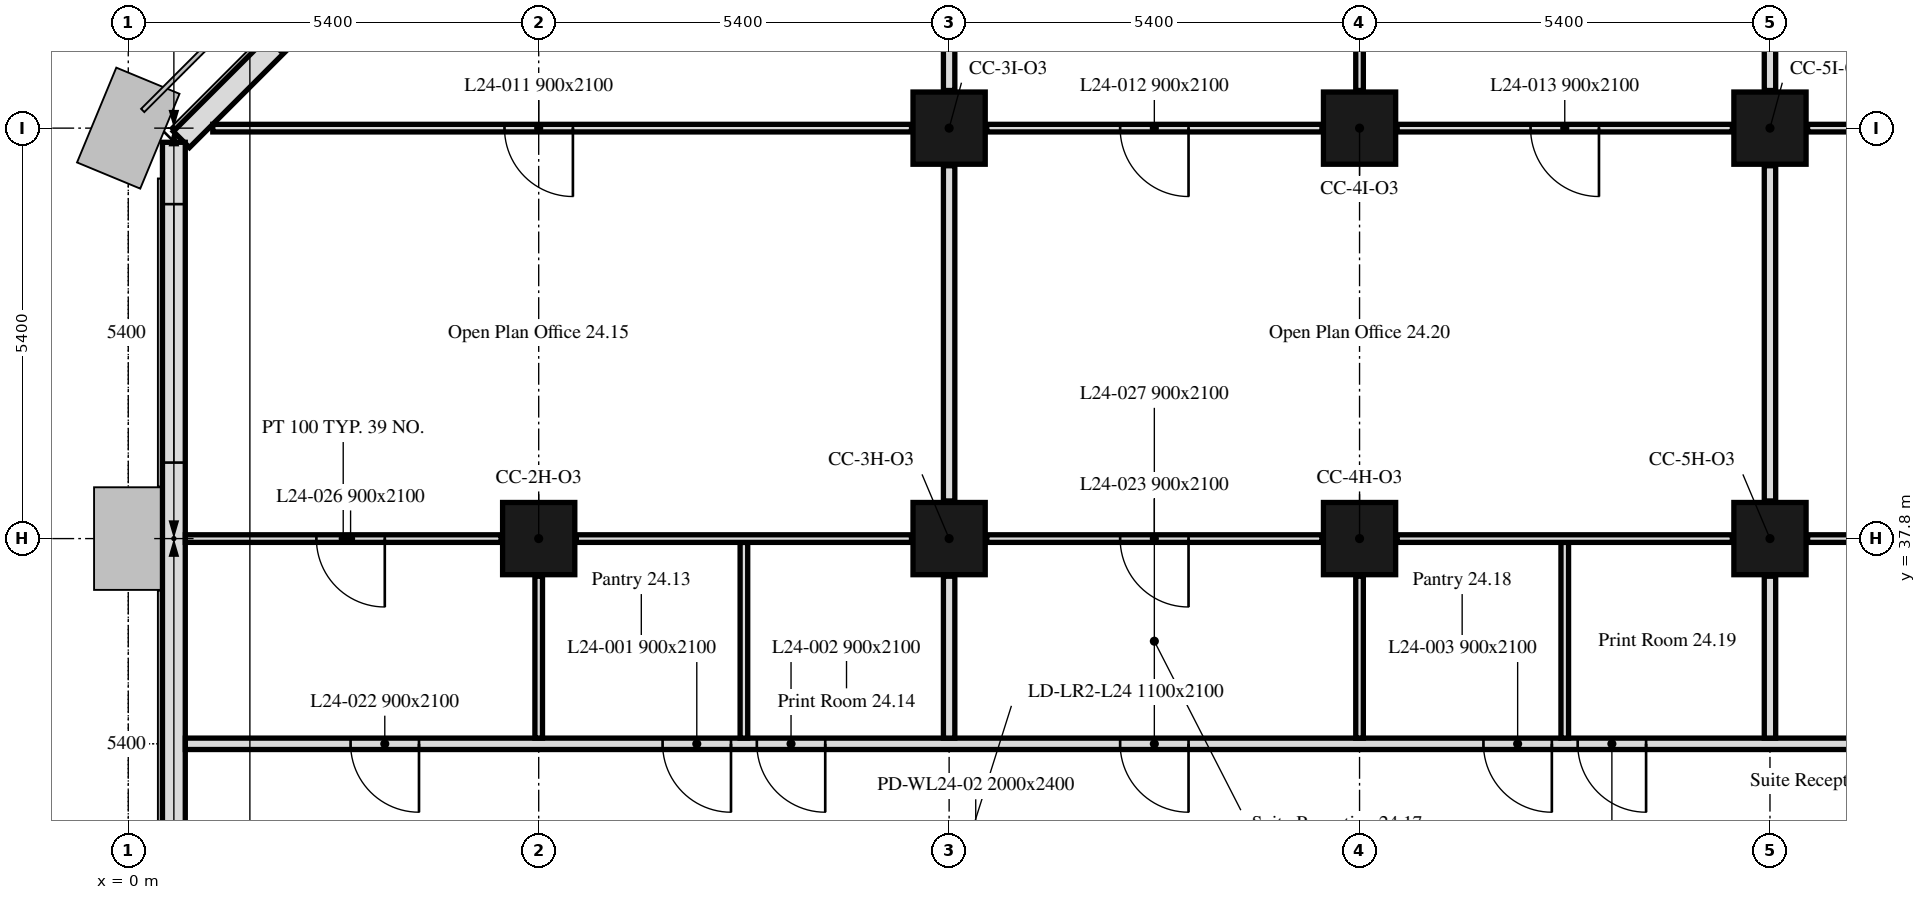
"""IFC4 building model, lengths in metres.
Left out: names, types, materials, properties, quantities, classifications, styles, units other than length and angle.
Written with IfcOpenShell. Run it as: python <this file> out.ifc"""

import sys

from ifc_helpers import new_model, si_unit, direction, frame, frame_2d, origin, origin_2d, place, context, subcontext, project, spatial, rectangle, extrude, element, fill, save


model = new_model("IFC4")
c1 = context("Model", 3, precision=1e-05, world=origin(), true_north=direction((0.0, 1.0)))
c2 = subcontext(c1, "Body", "Model", "MODEL_VIEW")
j1 = project(units=[si_unit("LENGTHUNIT", "METRE"), si_unit("PLANEANGLEUNIT", "RADIAN")], contexts=[c1])
p1 = place(None, origin())
s1 = spatial("IfcSite", under=j1, at=p1, CompositionType="ELEMENT")
p2 = place(p1, origin())
s2 = spatial("IfcBuilding", under=s1, at=p2, CompositionType="ELEMENT")
p3 = place(p2, frame((0.0, 0.0, 103.0)))
s3 = spatial("IfcBuildingStorey", under=s2, at=p3, CompositionType="ELEMENT", Elevation=103.0)
for number, where, z_axis, x_axis in (
    (1, (5.4, 37.8, 0.0), (0.0, 0.0, 1.0), (1.0, 0.0, 0.0)),
    (2, (10.8, 37.8, 0.0), (0.0, 0.0, 1.0), (1.0, 0.0, 0.0)),
    (3, (16.2, 37.8, 0.0), (0.0, 0.0, 1.0), (1.0, 0.0, 0.0)),
    (4, (21.6, 37.8, 0.0), (0.0, 0.0, 1.0), (1.0, 0.0, 0.0)),
    (5, (10.8, 43.2, 0.0), (0.0, 0.0, 1.0), (1.0, 0.0, 0.0)),
    (6, (16.2, 43.2, 0.0), (0.0, 0.0, 1.0), (1.0, 0.0, 0.0)),
    (7, (21.6, 43.2, 0.0), (0.0, 0.0, 1.0), (1.0, 0.0, 0.0)),
):
    element("IfcColumn", number, at=place(p3, frame(where, z_axis=z_axis, x_axis=x_axis)), inside=s3, PredefinedType="COLUMN", context=c2, shape_type="SweptSolid", body=[
        extrude(rectangle(XDim=0.95, YDim=0.95, at=origin_2d()), origin(), (0.0, 0.0, 1.0), 3.5),
    ])
p4 = place(p3, frame((5.55, 47.901, 0.0), z_axis=(0.0, 0.0, 1.0), x_axis=(-0.707106781187, -0.707106781187, 0.0)))
e8 = element("IfcWall", 8, at=p4, inside=s3, PredefinedType="SOLIDWALL", context=c2, shape_type="SweptSolid", body=[
    extrude(rectangle(XDim=6.86, YDim=0.3, at=frame_2d((3.43, 0.0))), origin(), (0.0, 0.0, 1.0), 3.5),
])
p5 = place(p4, frame((1.73, 0.0, 0.9)))
e9 = element("IfcOpeningElement", 9, at=p5, cuts=e8, PredefinedType="OPENING", context=c2, shape_type="SweptSolid", body=[
    extrude(rectangle(XDim=3.4, YDim=1.7, at=frame_2d((1.7, 0.85))), frame((0.0, 0.16, 0.0), z_axis=(0.0, -1.0, 0.0), x_axis=(1.0, 0.0, 0.0)), (0.0, 0.0, 1.0), 0.32),
])
p6 = place(p3, frame((0.6, 43.014, 0.0), z_axis=(0.0, 0.0, 1.0), x_axis=(0.0, -1.0, 0.0)))
e10 = element("IfcWall", 10, at=p6, inside=s3, PredefinedType="SOLIDWALL", context=c2, shape_type="SweptSolid", body=[
    extrude(rectangle(XDim=32.027, YDim=0.3, at=frame_2d((16.014, 0.0))), origin(), (0.0, 0.0, 1.0), 3.5),
])
p7 = place(p6, frame((0.814, 0.0, 0.9)))
e11 = element("IfcOpeningElement", 11, at=p7, cuts=e10, PredefinedType="OPENING", context=c2, shape_type="SweptSolid", body=[
    extrude(rectangle(XDim=3.4, YDim=1.7, at=frame_2d((1.7, 0.85))), frame((0.0, 0.16, 0.0), z_axis=(0.0, -1.0, 0.0), x_axis=(1.0, 0.0, 0.0)), (0.0, 0.0, 1.0), 0.32),
])
p8 = place(p6, frame((11.614, 0.0, 0.9)))
e12 = element("IfcOpeningElement", 12, at=p8, cuts=e10, PredefinedType="OPENING", context=c2, shape_type="SweptSolid", body=[
    extrude(rectangle(XDim=3.4, YDim=1.7, at=frame_2d((1.7, 0.85))), frame((0.0, 0.16, 0.0), z_axis=(0.0, -1.0, 0.0), x_axis=(1.0, 0.0, 0.0)), (0.0, 0.0, 1.0), 0.32),
])
p9 = place(p6, frame((22.414, 0.0, 0.9)))
e13 = element("IfcOpeningElement", 13, at=p9, cuts=e10, PredefinedType="OPENING", context=c2, shape_type="SweptSolid", body=[
    extrude(rectangle(XDim=3.4, YDim=1.7, at=frame_2d((1.7, 0.85))), frame((0.0, 0.16, 0.0), z_axis=(0.0, -1.0, 0.0), x_axis=(1.0, 0.0, 0.0)), (0.0, 0.0, 1.0), 0.32),
])
p10 = place(p3, frame((42.449, 35.1, 0.0), z_axis=(0.0, 0.0, 1.0), x_axis=(-1.0, 0.0, 0.0)))
e14 = element("IfcWall", 14, at=p10, inside=s3, PredefinedType="PARTITIONING", context=c2, shape_type="SweptSolid", body=[
    extrude(rectangle(XDim=41.698, YDim=0.15, at=frame_2d((20.849, 0.0))), origin(), (0.0, 0.0, 1.0), 2.75),
])
p11 = place(p10, frame((34.519, 0.0, 0.0)))
e15 = element("IfcOpeningElement", 15, at=p11, cuts=e14, PredefinedType="OPENING", context=c2, shape_type="SweptSolid", body=[
    extrude(rectangle(XDim=0.9, YDim=2.1, at=frame_2d((0.45, 1.05))), frame((0.0, 0.075, 0.0), z_axis=(0.0, -1.0, 0.0), x_axis=(1.0, 0.0, 0.0)), (0.0, 0.0, 1.0), 0.15),
])
p12 = place(p10, frame((33.279, 0.0, 0.0)))
e16 = element("IfcOpeningElement", 16, at=p12, cuts=e14, PredefinedType="OPENING", context=c2, shape_type="SweptSolid", body=[
    extrude(rectangle(XDim=0.9, YDim=2.1, at=frame_2d((0.45, 1.05))), frame((0.0, 0.075, 0.0), z_axis=(0.0, -1.0, 0.0), x_axis=(1.0, 0.0, 0.0)), (0.0, 0.0, 1.0), 0.15),
])
p13 = place(p10, frame((23.719, 0.0, 0.0)))
e17 = element("IfcOpeningElement", 17, at=p13, cuts=e14, PredefinedType="OPENING", context=c2, shape_type="SweptSolid", body=[
    extrude(rectangle(XDim=0.9, YDim=2.1, at=frame_2d((0.45, 1.05))), frame((0.0, 0.075, 0.0), z_axis=(0.0, -1.0, 0.0), x_axis=(1.0, 0.0, 0.0)), (0.0, 0.0, 1.0), 0.15),
])
p14 = place(p10, frame((22.479, 0.0, 0.0)))
e18 = element("IfcOpeningElement", 18, at=p14, cuts=e14, PredefinedType="OPENING", context=c2, shape_type="SweptSolid", body=[
    extrude(rectangle(XDim=0.9, YDim=2.1, at=frame_2d((0.45, 1.05))), frame((0.0, 0.075, 0.0), z_axis=(0.0, -1.0, 0.0), x_axis=(1.0, 0.0, 0.0)), (0.0, 0.0, 1.0), 0.15),
])
p15 = place(p10, frame((2.287, 0.0, 0.0)))
e19 = element("IfcOpeningElement", 19, at=p15, cuts=e14, PredefinedType="OPENING", context=c2, shape_type="SweptSolid", body=[
    extrude(rectangle(XDim=0.9, YDim=2.1, at=frame_2d((0.45, 1.05))), frame((0.0, 0.075, 0.0), z_axis=(0.0, -1.0, 0.0), x_axis=(1.0, 0.0, 0.0)), (0.0, 0.0, 1.0), 0.15),
])
p16 = place(p10, frame((0.879, 0.0, 0.0)))
e20 = element("IfcOpeningElement", 20, at=p16, cuts=e14, PredefinedType="OPENING", context=c2, shape_type="SweptSolid", body=[
    extrude(rectangle(XDim=0.9, YDim=2.1, at=frame_2d((0.45, 1.05))), frame((0.0, 0.075, 0.0), z_axis=(0.0, -1.0, 0.0), x_axis=(1.0, 0.0, 0.0)), (0.0, 0.0, 1.0), 0.15),
])
p17 = place(p10, frame((38.624, 0.0, 0.0)))
e21 = element("IfcOpeningElement", 21, at=p17, cuts=e14, PredefinedType="OPENING", context=c2, shape_type="SweptSolid", body=[
    extrude(rectangle(XDim=0.9, YDim=2.1, at=frame_2d((0.45, 1.05))), frame((0.0, 0.075, 0.0), z_axis=(0.0, -1.0, 0.0), x_axis=(1.0, 0.0, 0.0)), (0.0, 0.0, 1.0), 0.15),
])
p18 = place(p10, frame((28.499, 0.0, 0.0)))
e22 = element("IfcOpeningElement", 22, at=p18, cuts=e14, PredefinedType="OPENING", context=c2, shape_type="SweptSolid", body=[
    extrude(rectangle(XDim=0.9, YDim=2.1, at=frame_2d((0.45, 1.05))), frame((0.0, 0.075, 0.0), z_axis=(0.0, -1.0, 0.0), x_axis=(1.0, 0.0, 0.0)), (0.0, 0.0, 1.0), 0.15),
])
p19 = place(p10, frame((17.699, 0.0, 0.0)))
e23 = element("IfcOpeningElement", 23, at=p19, cuts=e14, PredefinedType="OPENING", context=c2, shape_type="SweptSolid", body=[
    extrude(rectangle(XDim=0.9, YDim=2.1, at=frame_2d((0.45, 1.05))), frame((0.0, 0.075, 0.0), z_axis=(0.0, -1.0, 0.0), x_axis=(1.0, 0.0, 0.0)), (0.0, 0.0, 1.0), 0.15),
])
p20 = place(p3, frame((4.905, 37.8, 0.0), z_axis=(0.0, 0.0, 1.0), x_axis=(-1.0, 0.0, 0.0)))
e24 = element("IfcWall", 24, at=p20, inside=s3, PredefinedType="PARTITIONING", context=c2, shape_type="SweptSolid", body=[
    extrude(rectangle(XDim=4.154, YDim=0.1, at=frame_2d((2.077, 0.0))), origin(), (0.0, 0.0, 1.0), 2.75),
])
p21 = place(p20, frame((1.53, 0.0, 0.0)))
e25 = element("IfcOpeningElement", 25, at=p21, cuts=e24, PredefinedType="OPENING", context=c2, shape_type="SweptSolid", body=[
    extrude(rectangle(XDim=0.9, YDim=2.1, at=frame_2d((0.45, 1.05))), frame((0.0, 0.05, 0.0), z_axis=(0.0, -1.0, 0.0), x_axis=(1.0, 0.0, 0.0)), (0.0, 0.0, 1.0), 0.1),
])
p22 = place(p3, frame((5.4, 35.175, 0.0), z_axis=(0.0, 0.0, 1.0), x_axis=(0.0, 1.0, 0.0)))
e26 = element("IfcWall", 26, at=p22, inside=s3, PredefinedType="PARTITIONING", context=c2, shape_type="SweptSolid", body=[
    extrude(rectangle(XDim=2.13, YDim=0.1, at=frame_2d((1.065, 0.0))), origin(), (0.0, 0.0, 1.0), 3.5),
])
p23 = place(p3, frame((8.1, 35.175, 0.0), z_axis=(0.0, 0.0, 1.0), x_axis=(0.0, 1.0, 0.0)))
e27 = element("IfcWall", 27, at=p23, inside=s3, PredefinedType="PARTITIONING", context=c2, shape_type="SweptSolid", body=[
    extrude(rectangle(XDim=2.575, YDim=0.1, at=frame_2d((1.288, 0.0))), origin(), (0.0, 0.0, 1.0), 3.5),
])
p24 = place(p3, frame((10.8, 35.175, 0.0), z_axis=(0.0, 0.0, 1.0), x_axis=(0.0, 1.0, 0.0)))
e28 = element("IfcWall", 28, at=p24, inside=s3, PredefinedType="PARTITIONING", context=c2, shape_type="SweptSolid", body=[
    extrude(rectangle(XDim=2.13, YDim=0.15, at=frame_2d((1.065, 0.0))), origin(), (0.0, 0.0, 1.0), 2.75),
])
p25 = place(p3, frame((10.305, 37.8, 0.0), z_axis=(0.0, 0.0, 1.0), x_axis=(-1.0, 0.0, 0.0)))
e29 = element("IfcWall", 29, at=p25, inside=s3, PredefinedType="PARTITIONING", context=c2, shape_type="SweptSolid", body=[
    extrude(rectangle(XDim=4.41, YDim=0.1, at=frame_2d((2.205, 0.0))), origin(), (0.0, 0.0, 1.0), 2.75),
])
p26 = place(p3, frame((10.305, 43.2, 0.0), z_axis=(0.0, 0.0, 1.0), x_axis=(-1.0, 0.0, 0.0)))
e30 = element("IfcWall", 30, at=p26, inside=s3, PredefinedType="PARTITIONING", context=c2, shape_type="SweptSolid", body=[
    extrude(rectangle(XDim=9.193, YDim=0.1, at=frame_2d((4.596, 0.0))), origin(), (0.0, 0.0, 1.0), 3.5),
])
p27 = place(p26, frame((4.455, 0.0, 0.0)))
e31 = element("IfcOpeningElement", 31, at=p27, cuts=e30, PredefinedType="OPENING", context=c2, shape_type="SweptSolid", body=[
    extrude(rectangle(XDim=0.9, YDim=2.1, at=frame_2d((0.45, 1.05))), frame((0.0, 0.05, 0.0), z_axis=(0.0, -1.0, 0.0), x_axis=(1.0, 0.0, 0.0)), (0.0, 0.0, 1.0), 0.1),
])
p28 = place(p3, frame((10.8, 38.295, 0.0), z_axis=(0.0, 0.0, 1.0), x_axis=(0.0, 1.0, 0.0)))
e32 = element("IfcWall", 32, at=p28, inside=s3, PredefinedType="PARTITIONING", context=c2, shape_type="SweptSolid", body=[
    extrude(rectangle(XDim=4.41, YDim=0.15, at=frame_2d((2.205, 0.0))), origin(), (0.0, 0.0, 1.0), 2.75),
])
p29 = place(p3, frame((10.8, 43.695, 0.0), z_axis=(0.0, 0.0, 1.0), x_axis=(0.0, 1.0, 0.0)))
e33 = element("IfcWall", 33, at=p29, inside=s3, PredefinedType="PARTITIONING", context=c2, shape_type="SweptSolid", body=[
    extrude(rectangle(XDim=4.154, YDim=0.15, at=frame_2d((2.077, 0.0))), origin(), (0.0, 0.0, 1.0), 2.75),
])
p30 = place(p3, frame((16.2, 35.175, 0.0), z_axis=(0.0, 0.0, 1.0), x_axis=(0.0, 1.0, 0.0)))
e34 = element("IfcWall", 34, at=p30, inside=s3, PredefinedType="PARTITIONING", context=c2, shape_type="SweptSolid", body=[
    extrude(rectangle(XDim=2.13, YDim=0.1, at=frame_2d((1.065, 0.0))), origin(), (0.0, 0.0, 1.0), 2.75),
])
p31 = place(p3, frame((15.705, 37.8, 0.0), z_axis=(0.0, 0.0, 1.0), x_axis=(-1.0, 0.0, 0.0)))
e35 = element("IfcWall", 35, at=p31, inside=s3, PredefinedType="PARTITIONING", context=c2, shape_type="SweptSolid", body=[
    extrude(rectangle(XDim=4.41, YDim=0.1, at=frame_2d((2.205, 0.0))), origin(), (0.0, 0.0, 1.0), 2.75),
])
p32 = place(p31, frame((1.755, 0.0, 0.0)))
e36 = element("IfcOpeningElement", 36, at=p32, cuts=e35, PredefinedType="OPENING", context=c2, shape_type="SweptSolid", body=[
    extrude(rectangle(XDim=0.9, YDim=2.1, at=frame_2d((0.45, 1.05))), frame((0.0, 0.05, 0.0), z_axis=(0.0, -1.0, 0.0), x_axis=(1.0, 0.0, 0.0)), (0.0, 0.0, 1.0), 0.1),
])
p33 = place(p3, frame((18.9, 35.175, 0.0), z_axis=(0.0, 0.0, 1.0), x_axis=(0.0, 1.0, 0.0)))
e37 = element("IfcWall", 37, at=p33, inside=s3, PredefinedType="PARTITIONING", context=c2, shape_type="SweptSolid", body=[
    extrude(rectangle(XDim=2.575, YDim=0.1, at=frame_2d((1.288, 0.0))), origin(), (0.0, 0.0, 1.0), 3.5),
])
p34 = place(p3, frame((21.6, 35.175, 0.0), z_axis=(0.0, 0.0, 1.0), x_axis=(0.0, 1.0, 0.0)))
e38 = element("IfcWall", 38, at=p34, inside=s3, PredefinedType="PARTITIONING", context=c2, shape_type="SweptSolid", body=[
    extrude(rectangle(XDim=2.13, YDim=0.15, at=frame_2d((1.065, 0.0))), origin(), (0.0, 0.0, 1.0), 2.75),
])
p35 = place(p3, frame((21.105, 37.8, 0.0), z_axis=(0.0, 0.0, 1.0), x_axis=(-1.0, 0.0, 0.0)))
e39 = element("IfcWall", 39, at=p35, inside=s3, PredefinedType="PARTITIONING", context=c2, shape_type="SweptSolid", body=[
    extrude(rectangle(XDim=4.41, YDim=0.1, at=frame_2d((2.205, 0.0))), origin(), (0.0, 0.0, 1.0), 3.5),
])
p36 = place(p3, frame((21.6, 38.295, 0.0), z_axis=(0.0, 0.0, 1.0), x_axis=(0.0, 1.0, 0.0)))
e40 = element("IfcWall", 40, at=p36, inside=s3, PredefinedType="PARTITIONING", context=c2, shape_type="SweptSolid", body=[
    extrude(rectangle(XDim=4.41, YDim=0.15, at=frame_2d((2.205, 0.0))), origin(), (0.0, 0.0, 1.0), 2.75),
])
p37 = place(p3, frame((21.105, 43.2, 0.0), z_axis=(0.0, 0.0, 1.0), x_axis=(-1.0, 0.0, 0.0)))
e41 = element("IfcWall", 41, at=p37, inside=s3, PredefinedType="PARTITIONING", context=c2, shape_type="SweptSolid", body=[
    extrude(rectangle(XDim=4.41, YDim=0.1, at=frame_2d((2.205, 0.0))), origin(), (0.0, 0.0, 1.0), 3.5),
])
p38 = place(p37, frame((1.755, 0.0, 0.0)))
e42 = element("IfcOpeningElement", 42, at=p38, cuts=e41, PredefinedType="OPENING", context=c2, shape_type="SweptSolid", body=[
    extrude(rectangle(XDim=0.9, YDim=2.1, at=frame_2d((0.45, 1.05))), frame((0.0, 0.05, 0.0), z_axis=(0.0, -1.0, 0.0), x_axis=(1.0, 0.0, 0.0)), (0.0, 0.0, 1.0), 0.1),
])
p39 = place(p3, frame((15.705, 43.2, 0.0), z_axis=(0.0, 0.0, 1.0), x_axis=(-1.0, 0.0, 0.0)))
e43 = element("IfcWall", 43, at=p39, inside=s3, PredefinedType="PARTITIONING", context=c2, shape_type="SweptSolid", body=[
    extrude(rectangle(XDim=4.41, YDim=0.1, at=frame_2d((2.205, 0.0))), origin(), (0.0, 0.0, 1.0), 3.5),
])
p40 = place(p39, frame((1.755, 0.0, 0.0)))
e44 = element("IfcOpeningElement", 44, at=p40, cuts=e43, PredefinedType="OPENING", context=c2, shape_type="SweptSolid", body=[
    extrude(rectangle(XDim=0.9, YDim=2.1, at=frame_2d((0.45, 1.05))), frame((0.0, 0.05, 0.0), z_axis=(0.0, -1.0, 0.0), x_axis=(1.0, 0.0, 0.0)), (0.0, 0.0, 1.0), 0.1),
])
p41 = place(p3, frame((16.2, 43.695, 0.0), z_axis=(0.0, 0.0, 1.0), x_axis=(0.0, 1.0, 0.0)))
e45 = element("IfcWall", 45, at=p41, inside=s3, PredefinedType="PARTITIONING", context=c2, shape_type="SweptSolid", body=[
    extrude(rectangle(XDim=4.154, YDim=0.1, at=frame_2d((2.077, 0.0))), origin(), (0.0, 0.0, 1.0), 2.75),
])
p42 = place(p3, frame((21.6, 43.695, 0.0), z_axis=(0.0, 0.0, 1.0), x_axis=(0.0, 1.0, 0.0)))
e46 = element("IfcWall", 46, at=p42, inside=s3, PredefinedType="PARTITIONING", context=c2, shape_type="SweptSolid", body=[
    extrude(rectangle(XDim=4.154, YDim=0.15, at=frame_2d((2.077, 0.0))), origin(), (0.0, 0.0, 1.0), 2.75),
])
p43 = place(p3, frame((26.505, 37.8, 0.0), z_axis=(0.0, 0.0, 1.0), x_axis=(-1.0, 0.0, 0.0)))
e47 = element("IfcWall", 47, at=p43, inside=s3, PredefinedType="PARTITIONING", context=c2, shape_type="SweptSolid", body=[
    extrude(rectangle(XDim=4.41, YDim=0.1, at=frame_2d((2.205, 0.0))), origin(), (0.0, 0.0, 1.0), 3.5),
])
p44 = place(p43, frame((1.755, 0.0, 0.0)))
e48 = element("IfcOpeningElement", 48, at=p44, cuts=e47, PredefinedType="OPENING", context=c2, shape_type="SweptSolid", body=[
    extrude(rectangle(XDim=0.9, YDim=2.1, at=frame_2d((0.45, 1.05))), frame((0.0, 0.05, 0.0), z_axis=(0.0, -1.0, 0.0), x_axis=(1.0, 0.0, 0.0)), (0.0, 0.0, 1.0), 0.1),
])
p45 = place(p3, frame((26.505, 43.2, 0.0), z_axis=(0.0, 0.0, 1.0), x_axis=(-1.0, 0.0, 0.0)))
e49 = element("IfcWall", 49, at=p45, inside=s3, PredefinedType="PARTITIONING", context=c2, shape_type="SweptSolid", body=[
    extrude(rectangle(XDim=4.41, YDim=0.1, at=frame_2d((2.205, 0.0))), origin(), (0.0, 0.0, 1.0), 3.5),
])
p46 = place(p7, origin())
e50 = element("IfcWindow", 50, at=p46, inside=s3, PartitioningType="SINGLE_PANEL", PredefinedType="WINDOW", context=c2, shape_type="SweptSolid", body=[
    extrude(rectangle(XDim=3.4, YDim=1.7, at=frame_2d((1.7, 0.85))), frame((0.0, 0.03, 0.0), z_axis=(0.0, -1.0, 0.0), x_axis=(1.0, 0.0, 0.0)), (0.0, 0.0, 1.0), 0.06),
])
fill(e11, e50)
p47 = place(p11, origin())
e51 = element("IfcDoor", 51, at=p47, inside=s3, OperationType="SINGLE_SWING_LEFT", PredefinedType="DOOR", context=c2, shape_type="SweptSolid", body=[
    extrude(rectangle(XDim=0.9, YDim=2.1, at=frame_2d((0.45, 1.05))), frame((0.0, 0.025, 0.0), z_axis=(0.0, -1.0, 0.0), x_axis=(1.0, 0.0, 0.0)), (0.0, 0.0, 1.0), 0.05),
])
fill(e15, e51)
p48 = place(p12, origin())
e52 = element("IfcDoor", 52, at=p48, inside=s3, OperationType="SINGLE_SWING_LEFT", PredefinedType="DOOR", context=c2, shape_type="SweptSolid", body=[
    extrude(rectangle(XDim=0.9, YDim=2.1, at=frame_2d((0.45, 1.05))), frame((0.0, 0.025, 0.0), z_axis=(0.0, -1.0, 0.0), x_axis=(1.0, 0.0, 0.0)), (0.0, 0.0, 1.0), 0.05),
])
fill(e16, e52)
p49 = place(p13, origin())
e53 = element("IfcDoor", 53, at=p49, inside=s3, OperationType="SINGLE_SWING_LEFT", PredefinedType="DOOR", context=c2, shape_type="SweptSolid", body=[
    extrude(rectangle(XDim=0.9, YDim=2.1, at=frame_2d((0.45, 1.05))), frame((0.0, 0.025, 0.0), z_axis=(0.0, -1.0, 0.0), x_axis=(1.0, 0.0, 0.0)), (0.0, 0.0, 1.0), 0.05),
])
fill(e17, e53)
p50 = place(p14, origin())
e54 = element("IfcDoor", 54, at=p50, inside=s3, OperationType="SINGLE_SWING_LEFT", PredefinedType="DOOR", context=c2, shape_type="SweptSolid", body=[
    extrude(rectangle(XDim=0.9, YDim=2.1, at=frame_2d((0.45, 1.05))), frame((0.0, 0.025, 0.0), z_axis=(0.0, -1.0, 0.0), x_axis=(1.0, 0.0, 0.0)), (0.0, 0.0, 1.0), 0.05),
])
fill(e18, e54)
p51 = place(p27, origin())
e55 = element("IfcDoor", 55, at=p51, inside=s3, OperationType="SINGLE_SWING_LEFT", PredefinedType="DOOR", context=c2, shape_type="SweptSolid", body=[
    extrude(rectangle(XDim=0.9, YDim=2.1, at=frame_2d((0.45, 1.05))), frame((0.0, 0.025, 0.0), z_axis=(0.0, -1.0, 0.0), x_axis=(1.0, 0.0, 0.0)), (0.0, 0.0, 1.0), 0.05),
])
fill(e31, e55)
p52 = place(p40, origin())
e56 = element("IfcDoor", 56, at=p52, inside=s3, OperationType="SINGLE_SWING_RIGHT", PredefinedType="DOOR", context=c2, shape_type="SweptSolid", body=[
    extrude(rectangle(XDim=0.9, YDim=2.1, at=frame_2d((0.45, 1.05))), frame((0.0, 0.025, 0.0), z_axis=(0.0, -1.0, 0.0), x_axis=(1.0, 0.0, 0.0)), (0.0, 0.0, 1.0), 0.05),
])
fill(e44, e56)
p53 = place(p38, origin())
e57 = element("IfcDoor", 57, at=p53, inside=s3, OperationType="SINGLE_SWING_RIGHT", PredefinedType="DOOR", context=c2, shape_type="SweptSolid", body=[
    extrude(rectangle(XDim=0.9, YDim=2.1, at=frame_2d((0.45, 1.05))), frame((0.0, 0.025, 0.0), z_axis=(0.0, -1.0, 0.0), x_axis=(1.0, 0.0, 0.0)), (0.0, 0.0, 1.0), 0.05),
])
fill(e42, e57)
p54 = place(p17, origin())
e58 = element("IfcDoor", 58, at=p54, inside=s3, OperationType="SINGLE_SWING_LEFT", PredefinedType="DOOR", context=c2, shape_type="SweptSolid", body=[
    extrude(rectangle(XDim=0.9, YDim=2.1, at=frame_2d((0.45, 1.05))), frame((0.0, 0.025, 0.0), z_axis=(0.0, -1.0, 0.0), x_axis=(1.0, 0.0, 0.0)), (0.0, 0.0, 1.0), 0.05),
])
fill(e21, e58)
p55 = place(p18, origin())
e59 = element("IfcDoor", 59, at=p55, inside=s3, OperationType="SINGLE_SWING_LEFT", PredefinedType="DOOR", context=c2, shape_type="SweptSolid", body=[
    extrude(rectangle(XDim=0.9, YDim=2.1, at=frame_2d((0.45, 1.05))), frame((0.0, 0.025, 0.0), z_axis=(0.0, -1.0, 0.0), x_axis=(1.0, 0.0, 0.0)), (0.0, 0.0, 1.0), 0.05),
])
fill(e22, e59)
p56 = place(p21, origin())
e60 = element("IfcDoor", 60, at=p56, inside=s3, OperationType="SINGLE_SWING_RIGHT", PredefinedType="DOOR", context=c2, shape_type="SweptSolid", body=[
    extrude(rectangle(XDim=0.9, YDim=2.1, at=frame_2d((0.45, 1.05))), frame((0.0, 0.025, 0.0), z_axis=(0.0, -1.0, 0.0), x_axis=(1.0, 0.0, 0.0)), (0.0, 0.0, 1.0), 0.05),
])
fill(e25, e60)
p57 = place(p32, origin())
e61 = element("IfcDoor", 61, at=p57, inside=s3, OperationType="SINGLE_SWING_LEFT", PredefinedType="DOOR", context=c2, shape_type="SweptSolid", body=[
    extrude(rectangle(XDim=0.9, YDim=2.1, at=frame_2d((0.45, 1.05))), frame((0.0, 0.025, 0.0), z_axis=(0.0, -1.0, 0.0), x_axis=(1.0, 0.0, 0.0)), (0.0, 0.0, 1.0), 0.05),
])
fill(e36, e61)
save(model, sys.argv[1])
